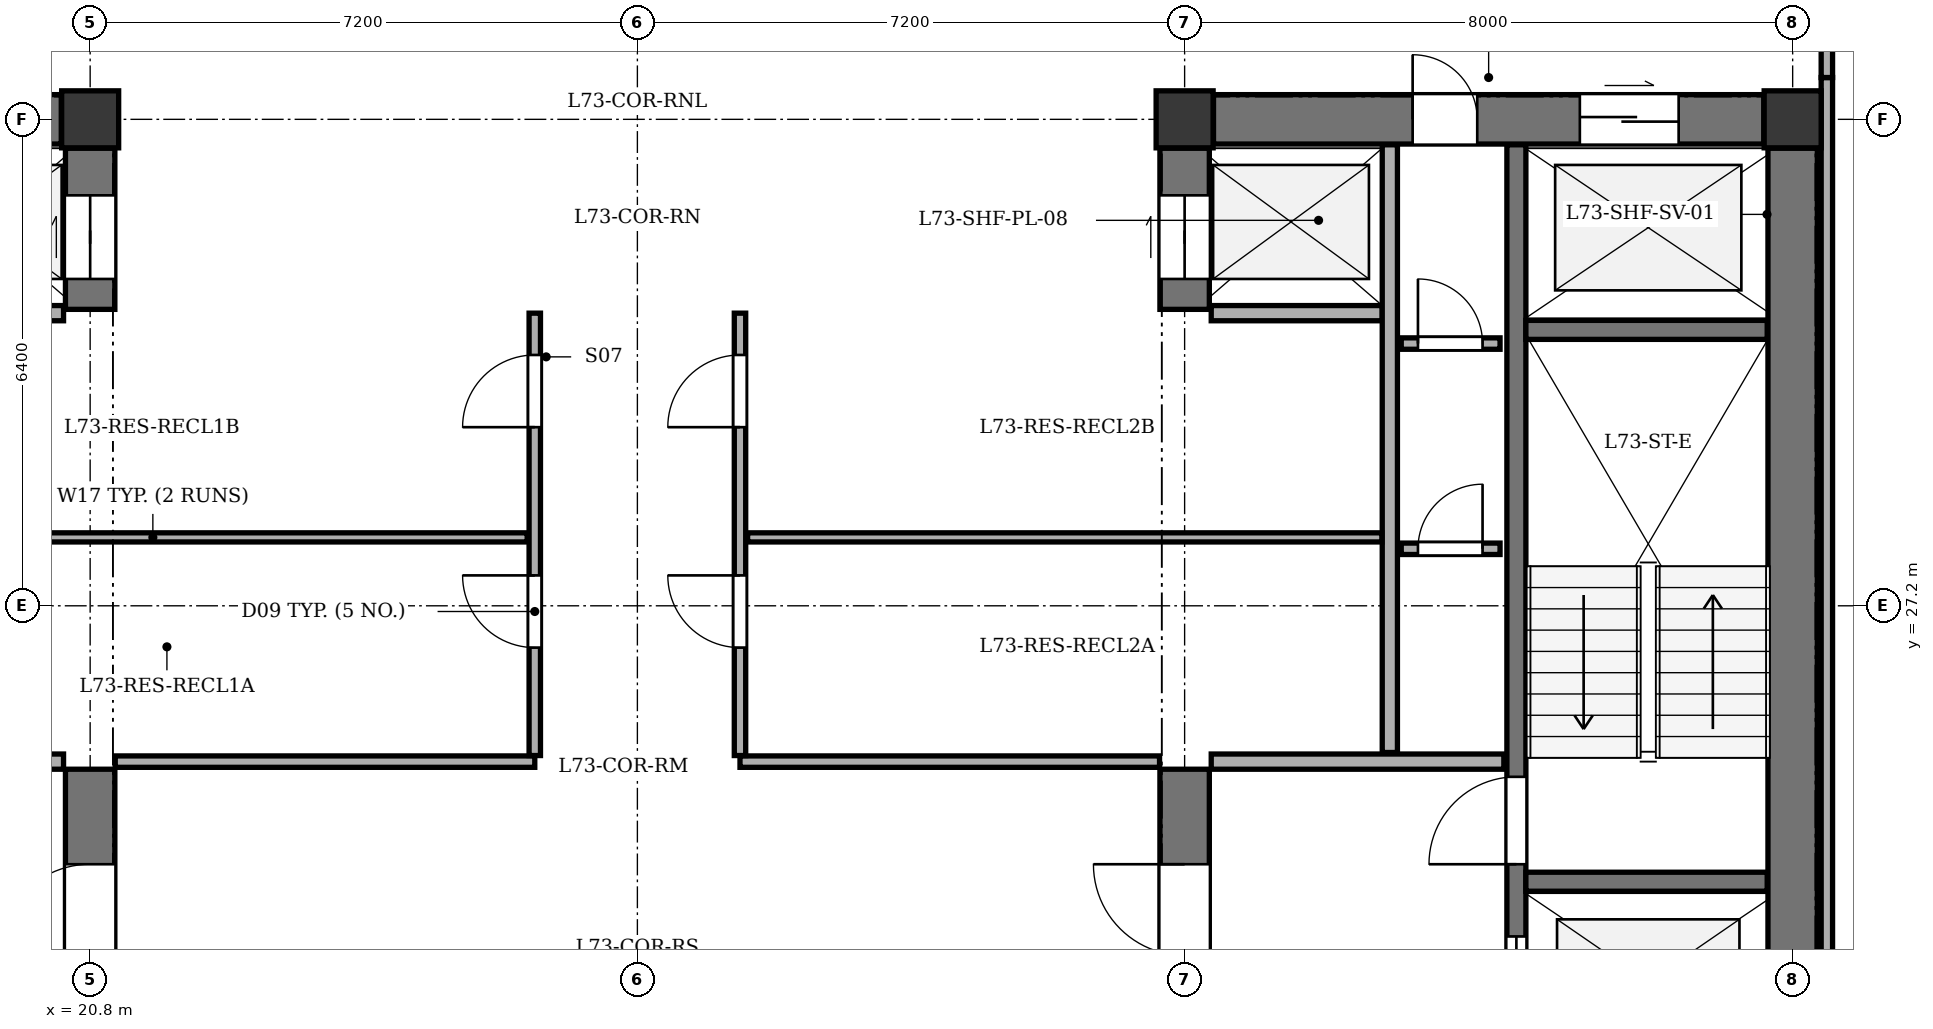
"""IFC4 building model, lengths in metres.
Left out: names, types, materials, properties, quantities, classifications, styles, units other than length and angle.
Written with IfcOpenShell. Run it as: python <this file> out.ifc"""

import sys

from ifc_helpers import new_model, si_unit, direction, frame, frame_2d, origin, origin_2d, place, context, subcontext, project, spatial, rectangle, extrude, element, fill, save


model = new_model("IFC4")
c1 = context("Model", 3, precision=1e-05, world=origin(), true_north=direction((0.0, 1.0)))
c2 = subcontext(c1, "Body", "Model", "MODEL_VIEW")
j1 = project(units=[si_unit("LENGTHUNIT", "METRE"), si_unit("PLANEANGLEUNIT", "RADIAN")], contexts=[c1])
p1 = place(None, origin())
s1 = spatial("IfcSite", under=j1, at=p1, CompositionType="ELEMENT")
p2 = place(p1, origin())
s2 = spatial("IfcBuilding", under=s1, at=p2, CompositionType="ELEMENT")
p3 = place(p2, frame((0.0, 0.0, 275.5)))
s3 = spatial("IfcBuildingStorey", under=s2, at=p3, CompositionType="ELEMENT", Elevation=275.5)
for number, where, z_axis, x_axis in (
    (1, (20.8, 33.6, 0.0), (0.0, 0.0, 1.0), (1.0, 0.0, 0.0)),
    (2, (35.2, 33.6, 0.0), (0.0, 0.0, 1.0), (1.0, 0.0, 0.0)),
    (3, (43.2, 33.6, 0.0), (0.0, 0.0, 1.0), (1.0, 0.0, 0.0)),
):
    element("IfcColumn", number, at=place(p3, frame(where, z_axis=z_axis, x_axis=x_axis)), inside=s3, PredefinedType="COLUMN", context=c2, shape_type="SweptSolid", body=[
        extrude(rectangle(XDim=0.75, YDim=0.75, at=origin_2d()), origin(), (0.0, 0.0, 1.0), 3.4),
    ])
p4 = place(p3, frame((13.18, 33.6, 0.0), z_axis=(0.0, 0.0, 1.0), x_axis=(1.0, 0.0, 0.0)))
e4 = element("IfcWall", 4, at=p4, inside=s3, PredefinedType="SHEAR", context=c2, shape_type="SweptSolid", body=[
    extrude(rectangle(XDim=7.24, YDim=0.65, at=frame_2d((3.62, 0.0))), origin(), (0.0, 0.0, 1.0), 3.1),
])
p5 = place(p4, frame((0.52, 0.0, 0.0)))
e5 = element("IfcOpeningElement", 5, at=p5, cuts=e4, PredefinedType="OPENING", context=c2, shape_type="SweptSolid", body=[
    extrude(rectangle(XDim=0.85, YDim=2.02, at=frame_2d((0.425, 1.01))), frame((0.0, 0.335, 0.0), z_axis=(0.0, -1.0, 0.0), x_axis=(1.0, 0.0, 0.0)), (0.0, 0.0, 1.0), 0.67),
])
p6 = place(p4, frame((1.82, 0.0, 0.0)))
e6 = element("IfcOpeningElement", 6, at=p6, cuts=e4, PredefinedType="OPENING", context=c2, shape_type="SweptSolid", body=[
    extrude(rectangle(XDim=0.85, YDim=2.02, at=frame_2d((0.425, 1.01))), frame((0.0, 0.335, 0.0), z_axis=(0.0, -1.0, 0.0), x_axis=(1.0, 0.0, 0.0)), (0.0, 0.0, 1.0), 0.67),
])
p7 = place(p3, frame((20.8, 21.18, 0.0), z_axis=(0.0, 0.0, 1.0), x_axis=(0.0, 1.0, 0.0)))
e7 = element("IfcWall", 7, at=p7, inside=s3, PredefinedType="SHEAR", context=c2, shape_type="SweptSolid", body=[
    extrude(rectangle(XDim=3.87, YDim=0.65, at=frame_2d((1.935, 0.0))), origin(), (0.0, 0.0, 1.0), 3.1),
])
p8 = place(p7, frame((1.42, 0.0, 0.0)))
e8 = element("IfcOpeningElement", 8, at=p8, cuts=e7, PredefinedType="OPENING", context=c2, shape_type="SweptSolid", body=[
    extrude(rectangle(XDim=1.2, YDim=2.15, at=frame_2d((0.6, 1.075))), frame((0.0, 0.335, 0.0), z_axis=(0.0, -1.0, 0.0), x_axis=(1.0, 0.0, 0.0)), (0.0, 0.0, 1.0), 0.67),
])
p9 = place(p3, frame((20.8, 31.1, 0.0), z_axis=(0.0, 0.0, 1.0), x_axis=(0.0, 1.0, 0.0)))
e9 = element("IfcWall", 9, at=p9, inside=s3, PredefinedType="SHEAR", context=c2, shape_type="SweptSolid", body=[
    extrude(rectangle(XDim=2.12, YDim=0.65, at=frame_2d((1.06, 0.0))), origin(), (0.0, 0.0, 1.0), 3.1),
])
p10 = place(p9, frame((0.4, 0.0, 0.0)))
e10 = element("IfcOpeningElement", 10, at=p10, cuts=e9, PredefinedType="OPENING", context=c2, shape_type="SweptSolid", body=[
    extrude(rectangle(XDim=1.1, YDim=2.1, at=frame_2d((0.55, 1.05))), frame((0.0, 0.335, 0.0), z_axis=(0.0, -1.0, 0.0), x_axis=(1.0, 0.0, 0.0)), (0.0, 0.0, 1.0), 0.67),
])
for number, where, z_axis, x_axis in (
    (11, (16.6, 25.15, 0.0), (0.0, 0.0, 1.0), (1.0, 0.0, 0.0)),
    (12, (16.6, 31.05, 0.0), (0.0, 0.0, 1.0), (1.0, 0.0, 0.0)),
):
    element("IfcWall", number, at=place(p3, frame(where, z_axis=z_axis, x_axis=x_axis)), inside=s3, PredefinedType="SOLIDWALL", context=c2, shape_type="SweptSolid", body=[
        extrude(rectangle(XDim=3.85, YDim=0.2, at=frame_2d((1.925, 0.0))), origin(), (0.0, 0.0, 1.0), 3.1),
    ])
p11 = place(p3, frame((43.2, 21.18, 0.0), z_axis=(0.0, 0.0, 1.0), x_axis=(0.0, 1.0, 0.0)))
e13 = element("IfcWall", 13, at=p11, inside=s3, PredefinedType="SHEAR", context=c2, shape_type="SweptSolid", body=[
    extrude(rectangle(XDim=12.04, YDim=0.65, at=frame_2d((6.02, 0.0))), origin(), (0.0, 0.0, 1.0), 3.1),
])
p12 = place(p3, frame((35.58, 33.6, 0.0), z_axis=(0.0, 0.0, 1.0), x_axis=(1.0, 0.0, 0.0)))
e14 = element("IfcWall", 14, at=p12, inside=s3, PredefinedType="SHEAR", context=c2, shape_type="SweptSolid", body=[
    extrude(rectangle(XDim=7.24, YDim=0.65, at=frame_2d((3.62, 0.0))), origin(), (0.0, 0.0, 1.0), 3.1),
])
p13 = place(p12, frame((4.82, 0.0, 0.0)))
e15 = element("IfcOpeningElement", 15, at=p13, cuts=e14, PredefinedType="OPENING", context=c2, shape_type="SweptSolid", body=[
    extrude(rectangle(XDim=1.3, YDim=2.15, at=frame_2d((0.65, 1.075))), frame((0.0, 0.335, 0.0), z_axis=(0.0, -1.0, 0.0), x_axis=(1.0, 0.0, 0.0)), (0.0, 0.0, 1.0), 0.67),
])
p14 = place(p12, frame((2.62, 0.0, 0.0)))
e16 = element("IfcOpeningElement", 16, at=p14, cuts=e14, PredefinedType="OPENING", context=c2, shape_type="SweptSolid", body=[
    extrude(rectangle(XDim=0.85, YDim=2.02, at=frame_2d((0.425, 1.01))), frame((0.0, 0.335, 0.0), z_axis=(0.0, -1.0, 0.0), x_axis=(1.0, 0.0, 0.0)), (0.0, 0.0, 1.0), 0.67),
])
p15 = place(p3, frame((35.2, 21.18, 0.0), z_axis=(0.0, 0.0, 1.0), x_axis=(0.0, 1.0, 0.0)))
e17 = element("IfcWall", 17, at=p15, inside=s3, PredefinedType="SHEAR", context=c2, shape_type="SweptSolid", body=[
    extrude(rectangle(XDim=3.87, YDim=0.65, at=frame_2d((1.935, 0.0))), origin(), (0.0, 0.0, 1.0), 3.1),
])
p16 = place(p15, frame((1.42, 0.0, 0.0)))
e18 = element("IfcOpeningElement", 18, at=p16, cuts=e17, PredefinedType="OPENING", context=c2, shape_type="SweptSolid", body=[
    extrude(rectangle(XDim=1.2, YDim=2.15, at=frame_2d((0.6, 1.075))), frame((0.0, 0.335, 0.0), z_axis=(0.0, -1.0, 0.0), x_axis=(1.0, 0.0, 0.0)), (0.0, 0.0, 1.0), 0.67),
])
p17 = place(p3, frame((35.2, 31.1, 0.0), z_axis=(0.0, 0.0, 1.0), x_axis=(0.0, 1.0, 0.0)))
e19 = element("IfcWall", 19, at=p17, inside=s3, PredefinedType="SHEAR", context=c2, shape_type="SweptSolid", body=[
    extrude(rectangle(XDim=2.12, YDim=0.65, at=frame_2d((1.06, 0.0))), origin(), (0.0, 0.0, 1.0), 3.1),
])
p18 = place(p17, frame((0.4, 0.0, 0.0)))
e20 = element("IfcOpeningElement", 20, at=p18, cuts=e19, PredefinedType="OPENING", context=c2, shape_type="SweptSolid", body=[
    extrude(rectangle(XDim=1.1, YDim=2.1, at=frame_2d((0.55, 1.05))), frame((0.0, 0.335, 0.0), z_axis=(0.0, -1.0, 0.0), x_axis=(1.0, 0.0, 0.0)), (0.0, 0.0, 1.0), 0.67),
])
p19 = place(p3, frame((39.565, 21.135, 0.0), z_axis=(0.0, 0.0, 1.0), x_axis=(0.0, 1.0, 0.0)))
e21 = element("IfcWall", 21, at=p19, inside=s3, PredefinedType="SHEAR", context=c2, shape_type="SweptSolid", body=[
    extrude(rectangle(XDim=12.13, YDim=0.25, at=frame_2d((6.065, 0.0))), origin(), (0.0, 0.0, 1.0), 3.1),
])
p20 = place(p19, frame((0.515, 0.0, 0.0)))
e22 = element("IfcOpeningElement", 22, at=p20, cuts=e21, PredefinedType="OPENING", context=c2, shape_type="SweptSolid", body=[
    extrude(rectangle(XDim=1.2, YDim=2.15, at=frame_2d((0.6, 1.075))), frame((0.0, 0.135, 0.0), z_axis=(0.0, -1.0, 0.0), x_axis=(1.0, 0.0, 0.0)), (0.0, 0.0, 1.0), 0.27),
])
p21 = place(p19, frame((2.665, 0.0, 0.0)))
e23 = element("IfcOpeningElement", 23, at=p21, cuts=e21, PredefinedType="OPENING", context=c2, shape_type="SweptSolid", body=[
    extrude(rectangle(XDim=1.15, YDim=2.15, at=frame_2d((0.575, 1.075))), frame((0.0, 0.135, 0.0), z_axis=(0.0, -1.0, 0.0), x_axis=(1.0, 0.0, 0.0)), (0.0, 0.0, 1.0), 0.27),
])
for number, where, z_axis, x_axis in (
    (24, (39.69, 23.57, 0.0), (0.0, 0.0, 1.0), (1.0, 0.0, 0.0)),
    (25, (39.69, 30.83, 0.0), (0.0, 0.0, 1.0), (1.0, 0.0, 0.0)),
):
    element("IfcWall", number, at=place(p3, frame(where, z_axis=z_axis, x_axis=x_axis)), inside=s3, PredefinedType="SHEAR", context=c2, shape_type="SweptSolid", body=[
        extrude(rectangle(XDim=3.175, YDim=0.25, at=frame_2d((1.587, 0.0))), origin(), (0.0, 0.0, 1.0), 3.1),
    ])
p22 = place(p3, frame((35.55, 25.15, 0.0), z_axis=(0.0, 0.0, 1.0), x_axis=(1.0, 0.0, 0.0)))
e26 = element("IfcWall", 26, at=p22, inside=s3, PredefinedType="SOLIDWALL", context=c2, shape_type="SweptSolid", body=[
    extrude(rectangle(XDim=3.85, YDim=0.2, at=frame_2d((1.925, 0.0))), origin(), (0.0, 0.0, 1.0), 3.1),
])
p23 = place(p3, frame((35.55, 31.05, 0.0), z_axis=(0.0, 0.0, 1.0), x_axis=(1.0, 0.0, 0.0)))
e27 = element("IfcWall", 27, at=p23, inside=s3, PredefinedType="SOLIDWALL", context=c2, shape_type="SweptSolid", body=[
    extrude(rectangle(XDim=2.25, YDim=0.2, at=frame_2d((1.125, 0.0))), origin(), (0.0, 0.0, 1.0), 3.1),
])
p24 = place(p3, frame((37.9, 25.27, 0.0), z_axis=(0.0, 0.0, 1.0), x_axis=(0.0, 1.0, 0.0)))
e28 = element("IfcWall", 28, at=p24, inside=s3, PredefinedType="SOLIDWALL", context=c2, shape_type="SweptSolid", body=[
    extrude(rectangle(XDim=7.995, YDim=0.2, at=frame_2d((3.998, 0.0))), origin(), (0.0, 0.0, 1.0), 3.1),
])
p25 = place(p3, frame((38.05, 27.95, 0.0), z_axis=(0.0, 0.0, 1.0), x_axis=(1.0, 0.0, 0.0)))
e29 = element("IfcWall", 29, at=p25, inside=s3, PredefinedType="PARTITIONING", context=c2, shape_type="SweptSolid", body=[
    extrude(rectangle(XDim=1.3, YDim=0.15, at=frame_2d((0.65, 0.0))), origin(), (0.0, 0.0, 1.0), 3.1),
])
p26 = place(p25, frame((0.22, 0.0, 0.0)))
e30 = element("IfcOpeningElement", 30, at=p26, cuts=e29, PredefinedType="OPENING", context=c2, shape_type="SweptSolid", body=[
    extrude(rectangle(XDim=0.85, YDim=2.02, at=frame_2d((0.425, 1.01))), frame((0.0, 0.085, 0.0), z_axis=(0.0, -1.0, 0.0), x_axis=(1.0, 0.0, 0.0)), (0.0, 0.0, 1.0), 0.17),
])
p27 = place(p3, frame((38.05, 30.65, 0.0), z_axis=(0.0, 0.0, 1.0), x_axis=(1.0, 0.0, 0.0)))
e31 = element("IfcWall", 31, at=p27, inside=s3, PredefinedType="PARTITIONING", context=c2, shape_type="SweptSolid", body=[
    extrude(rectangle(XDim=1.3, YDim=0.15, at=frame_2d((0.65, 0.0))), origin(), (0.0, 0.0, 1.0), 3.1),
])
p28 = place(p27, frame((0.22, 0.0, 0.0)))
e32 = element("IfcOpeningElement", 32, at=p28, cuts=e31, PredefinedType="OPENING", context=c2, shape_type="SweptSolid", body=[
    extrude(rectangle(XDim=0.85, YDim=2.02, at=frame_2d((0.425, 1.01))), frame((0.0, 0.085, 0.0), z_axis=(0.0, -1.0, 0.0), x_axis=(1.0, 0.0, 0.0)), (0.0, 0.0, 1.0), 0.17),
])
for number, where, z_axis, x_axis in (
    (33, (21.13, 25.15, 0.0), (0.0, 0.0, 1.0), (1.0, 0.0, 0.0)),
    (34, (29.35, 25.15, 0.0), (0.0, 0.0, 1.0), (1.0, 0.0, 0.0)),
):
    element("IfcWall", number, at=place(p3, frame(where, z_axis=z_axis, x_axis=x_axis)), inside=s3, PredefinedType="PARTITIONING", context=c2, shape_type="SweptSolid", body=[
        extrude(rectangle(XDim=5.52, YDim=0.15, at=frame_2d((2.76, 0.0))), origin(), (0.0, 0.0, 1.0), 3.1),
    ])
p29 = place(p3, frame((26.65, 25.23, 0.0), z_axis=(0.0, 0.0, 1.0), x_axis=(0.0, 1.0, 0.0)))
e35 = element("IfcWall", 35, at=p29, inside=s3, PredefinedType="PARTITIONING", context=c2, shape_type="SweptSolid", body=[
    extrude(rectangle(XDim=5.82, YDim=0.15, at=frame_2d((2.91, 0.0))), origin(), (0.0, 0.0, 1.0), 3.1),
])
p30 = place(p29, frame((1.42, 0.0, 0.0)))
e36 = element("IfcOpeningElement", 36, at=p30, cuts=e35, PredefinedType="OPENING", context=c2, shape_type="SweptSolid", body=[
    extrude(rectangle(XDim=0.95, YDim=2.1, at=frame_2d((0.475, 1.05))), frame((0.0, 0.085, 0.0), z_axis=(0.0, -1.0, 0.0), x_axis=(1.0, 0.0, 0.0)), (0.0, 0.0, 1.0), 0.17),
])
p31 = place(p29, frame((4.32, 0.0, 0.0)))
e37 = element("IfcOpeningElement", 37, at=p31, cuts=e35, PredefinedType="OPENING", context=c2, shape_type="SweptSolid", body=[
    extrude(rectangle(XDim=0.95, YDim=2.1, at=frame_2d((0.475, 1.05))), frame((0.0, 0.085, 0.0), z_axis=(0.0, -1.0, 0.0), x_axis=(1.0, 0.0, 0.0)), (0.0, 0.0, 1.0), 0.17),
])
p32 = place(p3, frame((16.7, 28.1, 0.0), z_axis=(0.0, 0.0, 1.0), x_axis=(1.0, 0.0, 0.0)))
e38 = element("IfcWall", 38, at=p32, inside=s3, PredefinedType="PARTITIONING", context=c2, shape_type="SweptSolid", body=[
    extrude(rectangle(XDim=9.85, YDim=0.12, at=frame_2d((4.925, 0.0))), origin(), (0.0, 0.0, 1.0), 3.1),
])
p33 = place(p3, frame((29.35, 25.23, 0.0), z_axis=(0.0, 0.0, 1.0), x_axis=(0.0, 1.0, 0.0)))
e39 = element("IfcWall", 39, at=p33, inside=s3, PredefinedType="PARTITIONING", context=c2, shape_type="SweptSolid", body=[
    extrude(rectangle(XDim=5.82, YDim=0.15, at=frame_2d((2.91, 0.0))), origin(), (0.0, 0.0, 1.0), 3.1),
])
p34 = place(p33, frame((1.42, 0.0, 0.0)))
e40 = element("IfcOpeningElement", 40, at=p34, cuts=e39, PredefinedType="OPENING", context=c2, shape_type="SweptSolid", body=[
    extrude(rectangle(XDim=0.95, YDim=2.1, at=frame_2d((0.475, 1.05))), frame((0.0, 0.085, 0.0), z_axis=(0.0, -1.0, 0.0), x_axis=(1.0, 0.0, 0.0)), (0.0, 0.0, 1.0), 0.17),
])
p35 = place(p33, frame((4.32, 0.0, 0.0)))
e41 = element("IfcOpeningElement", 41, at=p35, cuts=e39, PredefinedType="OPENING", context=c2, shape_type="SweptSolid", body=[
    extrude(rectangle(XDim=0.95, YDim=2.1, at=frame_2d((0.475, 1.05))), frame((0.0, 0.085, 0.0), z_axis=(0.0, -1.0, 0.0), x_axis=(1.0, 0.0, 0.0)), (0.0, 0.0, 1.0), 0.17),
])
p36 = place(p3, frame((29.45, 28.1, 0.0), z_axis=(0.0, 0.0, 1.0), x_axis=(1.0, 0.0, 0.0)))
e42 = element("IfcWall", 42, at=p36, inside=s3, PredefinedType="PARTITIONING", context=c2, shape_type="SweptSolid", body=[
    extrude(rectangle(XDim=8.345, YDim=0.12, at=frame_2d((4.172, 0.0))), origin(), (0.0, 0.0, 1.0), 3.1),
])
p37 = place(p3, frame((43.65, 20.88, 0.0), z_axis=(0.0, 0.0, 1.0), x_axis=(0.0, 1.0, 0.0)))
e43 = element("IfcWall", 43, at=p37, inside=s3, PredefinedType="PARTITIONING", context=c2, shape_type="SweptSolid", body=[
    extrude(rectangle(XDim=13.27, YDim=0.15, at=frame_2d((6.635, 0.0))), origin(), (0.0, 0.0, 1.0), 3.1),
])
p38 = place(p3, frame((43.65, 34.15, 0.0), z_axis=(0.0, 0.0, 1.0), x_axis=(0.0, 1.0, 0.0)))
e44 = element("IfcWall", 44, at=p38, inside=s3, PredefinedType="PARTITIONING", context=c2, shape_type="SweptSolid", body=[
    extrude(rectangle(XDim=1.79, YDim=0.15, at=frame_2d((0.895, 0.0))), origin(), (0.0, 0.0, 1.0), 3.1),
])
p39 = place(p38, frame((0.63, 0.0, 0.0)))
e45 = element("IfcOpeningElement", 45, at=p39, cuts=e44, PredefinedType="OPENING", context=c2, shape_type="SweptSolid", body=[
    extrude(rectangle(XDim=0.95, YDim=2.1, at=frame_2d((0.475, 1.05))), frame((0.0, 0.085, 0.0), z_axis=(0.0, -1.0, 0.0), x_axis=(1.0, 0.0, 0.0)), (0.0, 0.0, 1.0), 0.17),
])
p40 = place(p8, origin())
e46 = element("IfcDoor", 46, at=p40, inside=s3, OperationType="SINGLE_SWING_LEFT", PredefinedType="DOOR", context=c2, shape_type="SweptSolid", body=[
    extrude(rectangle(XDim=1.2, YDim=2.15, at=frame_2d((0.6, 1.075))), frame((0.0, 0.025, 0.0), z_axis=(0.0, -1.0, 0.0), x_axis=(1.0, 0.0, 0.0)), (0.0, 0.0, 1.0), 0.05),
])
fill(e8, e46)
p41 = place(p10, origin())
e47 = element("IfcDoor", 47, at=p41, inside=s3, OperationType="DOUBLE_DOOR_SLIDING", PredefinedType="DOOR", context=c2, shape_type="SweptSolid", body=[
    extrude(rectangle(XDim=1.1, YDim=2.1, at=frame_2d((0.55, 1.05))), frame((0.0, 0.025, 0.0), z_axis=(0.0, -1.0, 0.0), x_axis=(1.0, 0.0, 0.0)), (0.0, 0.0, 1.0), 0.05),
])
fill(e10, e47)
p42 = place(p13, origin())
e48 = element("IfcDoor", 48, at=p42, inside=s3, OperationType="DOUBLE_DOOR_SLIDING", PredefinedType="DOOR", context=c2, shape_type="SweptSolid", body=[
    extrude(rectangle(XDim=1.3, YDim=2.15, at=frame_2d((0.65, 1.075))), frame((0.0, 0.025, 0.0), z_axis=(0.0, -1.0, 0.0), x_axis=(1.0, 0.0, 0.0)), (0.0, 0.0, 1.0), 0.05),
])
fill(e15, e48)
p43 = place(p14, origin())
e49 = element("IfcDoor", 49, at=p43, inside=s3, OperationType="SINGLE_SWING_LEFT", PredefinedType="DOOR", context=c2, shape_type="SweptSolid", body=[
    extrude(rectangle(XDim=0.85, YDim=2.02, at=frame_2d((0.425, 1.01))), frame((0.0, 0.025, 0.0), z_axis=(0.0, -1.0, 0.0), x_axis=(1.0, 0.0, 0.0)), (0.0, 0.0, 1.0), 0.05),
])
fill(e16, e49)
p44 = place(p16, origin())
e50 = element("IfcDoor", 50, at=p44, inside=s3, OperationType="SINGLE_SWING_RIGHT", PredefinedType="DOOR", context=c2, shape_type="SweptSolid", body=[
    extrude(rectangle(XDim=1.2, YDim=2.15, at=frame_2d((0.6, 1.075))), frame((0.0, 0.025, 0.0), z_axis=(0.0, -1.0, 0.0), x_axis=(1.0, 0.0, 0.0)), (0.0, 0.0, 1.0), 0.05),
])
fill(e18, e50)
p45 = place(p18, origin())
e51 = element("IfcDoor", 51, at=p45, inside=s3, OperationType="DOUBLE_DOOR_SLIDING", PredefinedType="DOOR", context=c2, shape_type="SweptSolid", body=[
    extrude(rectangle(XDim=1.1, YDim=2.1, at=frame_2d((0.55, 1.05))), frame((0.0, 0.025, 0.0), z_axis=(0.0, -1.0, 0.0), x_axis=(1.0, 0.0, 0.0)), (0.0, 0.0, 1.0), 0.05),
])
fill(e20, e51)
p46 = place(p20, origin())
e52 = element("IfcDoor", 52, at=p46, inside=s3, OperationType="DOUBLE_DOOR_SLIDING", PredefinedType="DOOR", context=c2, shape_type="SweptSolid", body=[
    extrude(rectangle(XDim=1.2, YDim=2.15, at=frame_2d((0.6, 1.075))), frame((0.0, 0.025, 0.0), z_axis=(0.0, -1.0, 0.0), x_axis=(1.0, 0.0, 0.0)), (0.0, 0.0, 1.0), 0.05),
])
fill(e22, e52)
p47 = place(p21, origin())
e53 = element("IfcDoor", 53, at=p47, inside=s3, OperationType="SINGLE_SWING_LEFT", PredefinedType="DOOR", context=c2, shape_type="SweptSolid", body=[
    extrude(rectangle(XDim=1.15, YDim=2.15, at=frame_2d((0.575, 1.075))), frame((0.0, 0.025, 0.0), z_axis=(0.0, -1.0, 0.0), x_axis=(1.0, 0.0, 0.0)), (0.0, 0.0, 1.0), 0.05),
])
fill(e23, e53)
p48 = place(p26, origin())
e54 = element("IfcDoor", 54, at=p48, inside=s3, OperationType="SINGLE_SWING_RIGHT", PredefinedType="DOOR", context=c2, shape_type="SweptSolid", body=[
    extrude(rectangle(XDim=0.85, YDim=2.02, at=frame_2d((0.425, 1.01))), frame((0.0, 0.025, 0.0), z_axis=(0.0, -1.0, 0.0), x_axis=(1.0, 0.0, 0.0)), (0.0, 0.0, 1.0), 0.05),
])
fill(e30, e54)
p49 = place(p28, origin())
e55 = element("IfcDoor", 55, at=p49, inside=s3, OperationType="SINGLE_SWING_LEFT", PredefinedType="DOOR", context=c2, shape_type="SweptSolid", body=[
    extrude(rectangle(XDim=0.85, YDim=2.02, at=frame_2d((0.425, 1.01))), frame((0.0, 0.025, 0.0), z_axis=(0.0, -1.0, 0.0), x_axis=(1.0, 0.0, 0.0)), (0.0, 0.0, 1.0), 0.05),
])
fill(e32, e55)
p50 = place(p30, origin())
e56 = element("IfcDoor", 56, at=p50, inside=s3, OperationType="SINGLE_SWING_RIGHT", PredefinedType="DOOR", context=c2, shape_type="SweptSolid", body=[
    extrude(rectangle(XDim=0.95, YDim=2.1, at=frame_2d((0.475, 1.05))), frame((0.0, 0.025, 0.0), z_axis=(0.0, -1.0, 0.0), x_axis=(1.0, 0.0, 0.0)), (0.0, 0.0, 1.0), 0.05),
])
fill(e36, e56)
p51 = place(p31, origin())
e57 = element("IfcDoor", 57, at=p51, inside=s3, OperationType="SINGLE_SWING_LEFT", PredefinedType="DOOR", context=c2, shape_type="SweptSolid", body=[
    extrude(rectangle(XDim=0.95, YDim=2.1, at=frame_2d((0.475, 1.05))), frame((0.0, 0.025, 0.0), z_axis=(0.0, -1.0, 0.0), x_axis=(1.0, 0.0, 0.0)), (0.0, 0.0, 1.0), 0.05),
])
fill(e37, e57)
p52 = place(p34, origin())
e58 = element("IfcDoor", 58, at=p52, inside=s3, OperationType="SINGLE_SWING_RIGHT", PredefinedType="DOOR", context=c2, shape_type="SweptSolid", body=[
    extrude(rectangle(XDim=0.95, YDim=2.1, at=frame_2d((0.475, 1.05))), frame((0.0, 0.025, 0.0), z_axis=(0.0, -1.0, 0.0), x_axis=(1.0, 0.0, 0.0)), (0.0, 0.0, 1.0), 0.05),
])
fill(e40, e58)
p53 = place(p35, origin())
e59 = element("IfcDoor", 59, at=p53, inside=s3, OperationType="SINGLE_SWING_LEFT", PredefinedType="DOOR", context=c2, shape_type="SweptSolid", body=[
    extrude(rectangle(XDim=0.95, YDim=2.1, at=frame_2d((0.475, 1.05))), frame((0.0, 0.025, 0.0), z_axis=(0.0, -1.0, 0.0), x_axis=(1.0, 0.0, 0.0)), (0.0, 0.0, 1.0), 0.05),
])
fill(e41, e59)
save(model, sys.argv[1])
